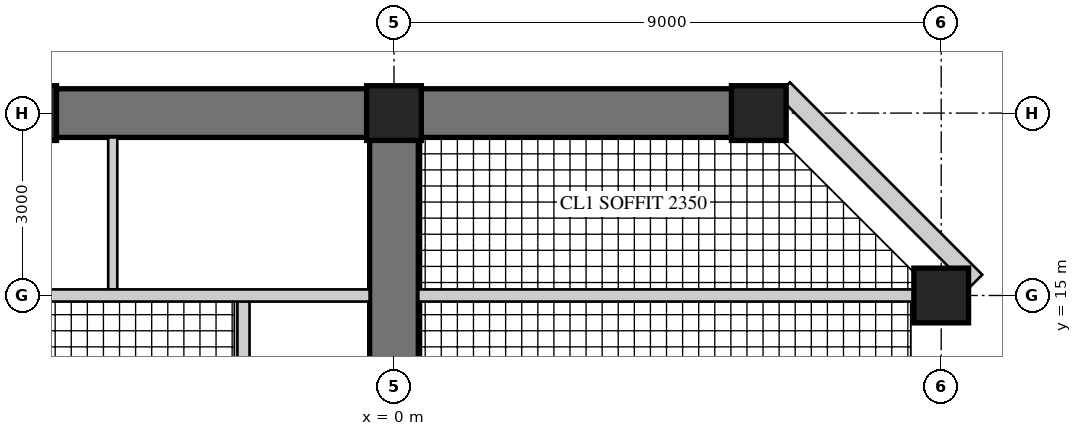
"""IFC4 building model, lengths in metres.
Left out: names, types, materials, properties, quantities, classifications, styles, units other than length and angle.
Written with IfcOpenShell. Run it as: python <this file> out.ifc"""

import sys

from ifc_helpers import new_model, si_unit, direction, frame, frame_2d, origin, origin_2d, place, context, subcontext, project, spatial, rectangle, hollow_rectangle, extrude, element, fill, save


model = new_model("IFC4")
c1 = context("Model", 3, precision=1e-05, world=origin(), true_north=direction((0.0, 1.0)))
c2 = subcontext(c1, "Body", "Model", "MODEL_VIEW")
j1 = project(units=[si_unit("LENGTHUNIT", "METRE"), si_unit("PLANEANGLEUNIT", "RADIAN")], contexts=[c1])
p1 = place(None, origin())
s1 = spatial("IfcSite", under=j1, at=p1, CompositionType="ELEMENT")
p2 = place(p1, origin())
s2 = spatial("IfcBuilding", under=s1, at=p2, CompositionType="ELEMENT")
p3 = place(p2, frame((0.0, 0.0, 200.1)))
s3 = spatial("IfcBuildingStorey", under=s2, at=p3, CompositionType="ELEMENT", Elevation=200.1)
p4 = place(p3, frame((0.0, 9.0, 0.0), z_axis=(0.0, 0.0, 1.0), x_axis=(0.0, 1.0, 0.0)))
e1 = element("IfcWall", 1, at=p4, inside=s3, PredefinedType="SHEAR", context=c2, shape_type="SweptSolid", body=[
    extrude(rectangle(XDim=9.0, YDim=0.8, at=frame_2d((4.5, 0.0))), origin(), (0.0, 0.0, 1.0), 3.4),
])
p5 = place(p4, frame((3.95, 0.0, 0.0)))
e2 = element("IfcOpeningElement", 2, at=p5, cuts=e1, PredefinedType="OPENING", context=c2, shape_type="SweptSolid", body=[
    extrude(rectangle(XDim=1.0, YDim=2.15, at=frame_2d((0.5, 1.075))), frame((0.0, 0.41, 0.0), z_axis=(0.0, -1.0, 0.0), x_axis=(1.0, 0.0, 0.0)), (0.0, 0.0, 1.0), 0.82),
])
p6 = place(p4, frame((7.0, 0.0, 0.0)))
e3 = element("IfcOpeningElement", 3, at=p6, cuts=e1, PredefinedType="OPENING", context=c2, shape_type="SweptSolid", body=[
    extrude(rectangle(XDim=1.0, YDim=2.2, at=frame_2d((0.5, 1.1))), frame((0.0, 0.41, 0.0), z_axis=(0.0, -1.0, 0.0), x_axis=(1.0, 0.0, 0.0)), (0.0, 0.0, 1.0), 0.82),
])
p7 = place(p3, frame((6.0, 18.0, 0.0), z_axis=(0.0, 0.0, 1.0), x_axis=(-1.0, 0.0, 0.0)))
e4 = element("IfcWall", 4, at=p7, inside=s3, PredefinedType="SHEAR", context=c2, shape_type="SweptSolid", body=[
    extrude(rectangle(XDim=12.0, YDim=0.8, at=frame_2d((6.0, 0.0))), origin(), (0.0, 0.0, 1.0), 3.4),
])
p8 = place(p7, frame((1.625, 0.0, 0.6)))
e5 = element("IfcOpeningElement", 5, at=p8, cuts=e4, PredefinedType="OPENING", context=c2, shape_type="SweptSolid", body=[
    extrude(rectangle(XDim=3.0, YDim=2.4, at=frame_2d((1.5, 1.2))), frame((0.0, 0.41, 0.0), z_axis=(0.0, -1.0, 0.0), x_axis=(1.0, 0.0, 0.0)), (0.0, 0.0, 1.0), 0.82),
])
p9 = place(p7, frame((7.375, 0.0, 0.6)))
e6 = element("IfcOpeningElement", 6, at=p9, cuts=e4, PredefinedType="OPENING", context=c2, shape_type="SweptSolid", body=[
    extrude(rectangle(XDim=3.0, YDim=2.4, at=frame_2d((1.5, 1.2))), frame((0.0, 0.41, 0.0), z_axis=(0.0, -1.0, 0.0), x_axis=(1.0, 0.0, 0.0)), (0.0, 0.0, 1.0), 0.82),
])
for number, where, z_axis, x_axis in (
    (7, (9.0, 15.0, 0.0), (0.0, 0.0, 1.0), (1.0, 0.0, 0.0)),
    (8, (6.0, 18.0, 0.0), (0.0, 0.0, 1.0), (1.0, 0.0, 0.0)),
    (9, (0.0, 18.0, 0.0), (0.0, 0.0, 1.0), (1.0, 0.0, 0.0)),
    (10, (-6.0, 18.0, 0.0), (0.0, 0.0, 1.0), (1.0, 0.0, 0.0)),
):
    element("IfcColumn", number, at=place(p3, frame(where, z_axis=z_axis, x_axis=x_axis)), inside=s3, PredefinedType="COLUMN", context=c2, shape_type="SweptSolid", body=[
        extrude(rectangle(XDim=0.9, YDim=0.9, at=origin_2d()), origin(), (0.0, 0.0, 1.0), 3.4),
    ])
p10 = place(p3, frame((9.57, 15.236, 0.0), z_axis=(0.0, 0.0, 1.0), x_axis=(-0.707134062067, 0.707079499254, 0.0)))
e11 = element("IfcWall", 11, at=p10, inside=s3, PredefinedType="SOLIDWALL", context=c2, shape_type="SweptSolid", body=[
    extrude(rectangle(XDim=4.475, YDim=0.3, at=frame_2d((2.237, 0.0))), origin(), (0.0, 0.0, 1.0), 3.22),
])
p11 = place(p10, frame((1.787, 0.0, 0.3)))
e12 = element("IfcOpeningElement", 12, at=p11, cuts=e11, PredefinedType="OPENING", context=c2, shape_type="SweptSolid", body=[
    extrude(rectangle(XDim=0.9, YDim=2.4, at=frame_2d((0.45, 1.2))), frame((0.0, 0.16, 0.0), z_axis=(0.0, -1.0, 0.0), x_axis=(1.0, 0.0, 0.0)), (0.0, 0.0, 1.0), 0.32),
])
p12 = place(p3, frame((-2.475, 9.55, 0.0), z_axis=(0.0, 0.0, 1.0), x_axis=(0.0, 1.0, 0.0)))
e13 = element("IfcWall", 13, at=p12, inside=s3, PredefinedType="SOLIDWALL", context=c2, shape_type="SweptSolid", body=[
    extrude(rectangle(XDim=5.45, YDim=0.2, at=frame_2d((2.725, 0.0))), origin(), (0.0, 0.0, 1.0), 3.22),
])
p13 = place(p12, frame((3.4, 0.0, 0.0)))
e14 = element("IfcOpeningElement", 14, at=p13, cuts=e13, PredefinedType="OPENING", context=c2, shape_type="SweptSolid", body=[
    extrude(rectangle(XDim=1.0, YDim=2.15, at=frame_2d((0.5, 1.075))), frame((0.0, 0.11, 0.0), z_axis=(0.0, -1.0, 0.0), x_axis=(1.0, 0.0, 0.0)), (0.0, 0.0, 1.0), 0.22),
])
p14 = place(p3, frame((-4.625, 15.1, 0.0), z_axis=(0.0, 0.0, 1.0), x_axis=(0.0, 1.0, 0.0)))
e15 = element("IfcWall", 15, at=p14, inside=s3, PredefinedType="PARTITIONING", context=c2, shape_type="SweptSolid", body=[
    extrude(rectangle(XDim=2.5, YDim=0.15, at=frame_2d((1.25, 0.0))), origin(), (0.0, 0.0, 1.0), 3.22),
])
p15 = place(p14, frame((0.6, 0.0, 0.0)))
e16 = element("IfcOpeningElement", 16, at=p15, cuts=e15, PredefinedType="OPENING", context=c2, shape_type="SweptSolid", body=[
    extrude(rectangle(XDim=1.0, YDim=2.1, at=frame_2d((0.5, 1.05))), frame((0.0, 0.085, 0.0), z_axis=(0.0, -1.0, 0.0), x_axis=(1.0, 0.0, 0.0)), (0.0, 0.0, 1.0), 0.17),
])
p16 = place(p3, frame((8.55, 15.0, 0.0), z_axis=(0.0, 0.0, 1.0), x_axis=(-1.0, 0.0, 0.0)))
e17 = element("IfcWall", 17, at=p16, inside=s3, PredefinedType="SOLIDWALL", context=c2, shape_type="SweptSolid", body=[
    extrude(rectangle(XDim=8.15, YDim=0.2, at=frame_2d((4.075, 0.0))), origin(), (0.0, 0.0, 1.0), 2.47),
])
p17 = place(p3, frame((-0.4, 15.0, 0.0), z_axis=(0.0, 0.0, 1.0), x_axis=(-1.0, 0.0, 0.0)))
e18 = element("IfcWall", 18, at=p17, inside=s3, PredefinedType="SOLIDWALL", context=c2, shape_type="SweptSolid", body=[
    extrude(rectangle(XDim=8.15, YDim=0.2, at=frame_2d((4.075, 0.0))), origin(), (0.0, 0.0, 1.0), 2.47),
])
p18 = place(p17, frame((0.4, 0.0, 0.0)))
e19 = element("IfcOpeningElement", 19, at=p18, cuts=e18, PredefinedType="OPENING", context=c2, shape_type="SweptSolid", body=[
    extrude(rectangle(XDim=1.0, YDim=2.2, at=frame_2d((0.5, 1.1))), frame((0.0, 0.11, 0.0), z_axis=(0.0, -1.0, 0.0), x_axis=(1.0, 0.0, 0.0)), (0.0, 0.0, 1.0), 0.22),
])
p19 = place(p11, origin())
e20 = element("IfcWindow", 20, at=p19, inside=s3, PartitioningType="SINGLE_PANEL", PredefinedType="WINDOW", context=c2, shape_type="SweptSolid", body=[
    extrude(hollow_rectangle(XDim=0.9, YDim=2.4, WallThickness=0.06, at=frame_2d((0.45, 1.2))), frame((0.0, 0.03, 0.0), z_axis=(0.0, -1.0, 0.0), x_axis=(1.0, 0.0, 0.0)), (0.0, 0.0, 1.0), 0.06),
    extrude(rectangle(XDim=0.779, YDim=2.279, at=frame_2d((0.45, 1.2))), frame((0.0, 0.03, 0.0), z_axis=(0.0, -1.0, 0.0), x_axis=(1.0, 0.0, 0.0)), (0.0, 0.0, 1.0), 0.06),
])
fill(e12, e20)
p20 = place(p8, origin())
e21 = element("IfcWindow", 21, at=p20, inside=s3, PartitioningType="SINGLE_PANEL", PredefinedType="WINDOW", context=c2, shape_type="SweptSolid", body=[
    extrude(hollow_rectangle(XDim=3.0, YDim=2.4, WallThickness=0.06, at=frame_2d((1.5, 1.2))), frame((0.0, 0.03, 0.0), z_axis=(0.0, -1.0, 0.0), x_axis=(1.0, 0.0, 0.0)), (0.0, 0.0, 1.0), 0.06),
    extrude(rectangle(XDim=2.879, YDim=2.279, at=frame_2d((1.5, 1.2))), frame((0.0, 0.03, 0.0), z_axis=(0.0, -1.0, 0.0), x_axis=(1.0, 0.0, 0.0)), (0.0, 0.0, 1.0), 0.06),
])
fill(e5, e21)
p21 = place(p9, origin())
e22 = element("IfcWindow", 22, at=p21, inside=s3, PartitioningType="SINGLE_PANEL", PredefinedType="WINDOW", context=c2, shape_type="SweptSolid", body=[
    extrude(hollow_rectangle(XDim=3.0, YDim=2.4, WallThickness=0.06, at=frame_2d((1.5, 1.2))), frame((0.0, 0.03, 0.0), z_axis=(0.0, -1.0, 0.0), x_axis=(1.0, 0.0, 0.0)), (0.0, 0.0, 1.0), 0.06),
    extrude(rectangle(XDim=2.879, YDim=2.279, at=frame_2d((1.5, 1.2))), frame((0.0, 0.03, 0.0), z_axis=(0.0, -1.0, 0.0), x_axis=(1.0, 0.0, 0.0)), (0.0, 0.0, 1.0), 0.06),
])
fill(e6, e22)
p22 = place(p15, origin())
e23 = element("IfcDoor", 23, at=p22, inside=s3, OperationType="SINGLE_SWING_LEFT", PredefinedType="DOOR", context=c2, shape_type="SweptSolid", body=[
    extrude(rectangle(XDim=1.0, YDim=2.1, at=frame_2d((0.5, 1.05))), frame((0.0, 0.025, 0.0), z_axis=(0.0, -1.0, 0.0), x_axis=(1.0, 0.0, 0.0)), (0.0, 0.0, 1.0), 0.05),
])
fill(e16, e23)
p23 = place(p18, frame((1.0, 0.0, 0.0), z_axis=(0.0, 0.0, 1.0), x_axis=(-1.0, 0.0, 0.0)))
e24 = element("IfcDoor", 24, at=p23, inside=s3, OperationType="SINGLE_SWING_RIGHT", PredefinedType="DOOR", context=c2, shape_type="SweptSolid", body=[
    extrude(rectangle(XDim=1.0, YDim=2.2, at=frame_2d((0.5, 1.1))), frame((0.0, 0.025, 0.0), z_axis=(0.0, -1.0, 0.0), x_axis=(1.0, 0.0, 0.0)), (0.0, 0.0, 1.0), 0.05),
])
fill(e19, e24)
p24 = place(p6, origin())
e25 = element("IfcDoor", 25, at=p24, inside=s3, OperationType="SINGLE_SWING_RIGHT", PredefinedType="DOOR", context=c2, shape_type="SweptSolid", body=[
    extrude(rectangle(XDim=1.0, YDim=2.2, at=frame_2d((0.5, 1.1))), frame((0.0, 0.025, 0.0), z_axis=(0.0, -1.0, 0.0), x_axis=(1.0, 0.0, 0.0)), (0.0, 0.0, 1.0), 0.05),
])
fill(e3, e25)
save(model, sys.argv[1])
